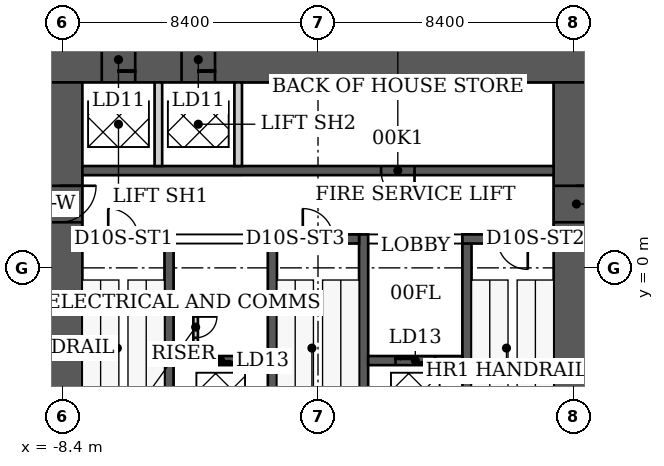
"""IFC4 building model, lengths in metres.
Left out: names, types, materials, properties, quantities, classifications, styles, units other than length and angle.
Written with IfcOpenShell. Run it as: python <this file> out.ifc"""

import sys

from ifc_helpers import new_model, si_unit, direction, frame, frame_2d, origin, place, context, subcontext, project, spatial, rectangle, extrude, element, fill, save


model = new_model("IFC4")
c1 = context("Model", 3, precision=1e-05, world=origin(), true_north=direction((0.0, 1.0)))
c2 = subcontext(c1, "Body", "Model", "MODEL_VIEW")
j1 = project(units=[si_unit("LENGTHUNIT", "METRE"), si_unit("PLANEANGLEUNIT", "RADIAN")], contexts=[c1])
p1 = place(None, origin())
s1 = spatial("IfcSite", under=j1, at=p1, CompositionType="ELEMENT")
p2 = place(p1, origin())
s2 = spatial("IfcBuilding", under=s1, at=p2, CompositionType="ELEMENT")
p3 = place(p2, origin())
s3 = spatial("IfcBuildingStorey", under=s2, at=p3, CompositionType="ELEMENT", Elevation=0.0)
p4 = place(p3, frame((-9.25, 6.85, -0.2), z_axis=(0.0, 0.0, 1.0), x_axis=(1.0, 0.0, 0.0)))
e1 = element("IfcWall", 1, at=p4, inside=s3, PredefinedType="SHEAR", context=c2, shape_type="SweptSolid", body=[
    extrude(rectangle(XDim=18.5, YDim=1.5, at=frame_2d((9.25, 0.0))), origin(), (0.0, 0.0, 1.0), 6.2),
])
p5 = place(p4, frame((2.137, 0.0, 0.2)))
e2 = element("IfcOpeningElement", 2, at=p5, cuts=e1, PredefinedType="OPENING", context=c2, shape_type="SweptSolid", body=[
    extrude(rectangle(XDim=1.1, YDim=2.1, at=frame_2d((0.55, 1.05))), frame((0.0, 0.75, 0.0), z_axis=(0.0, -1.0, 0.0), x_axis=(1.0, 0.0, 0.0)), (0.0, 0.0, 1.0), 1.5),
])
p6 = place(p4, frame((4.762, 0.0, 0.2)))
e3 = element("IfcOpeningElement", 3, at=p6, cuts=e1, PredefinedType="OPENING", context=c2, shape_type="SweptSolid", body=[
    extrude(rectangle(XDim=1.1, YDim=2.1, at=frame_2d((0.55, 1.05))), frame((0.0, 0.75, 0.0), z_axis=(0.0, -1.0, 0.0), x_axis=(1.0, 0.0, 0.0)), (0.0, 0.0, 1.0), 1.5),
])
p7 = place(p3, frame((-8.5, -9.2, -0.2), z_axis=(0.0, 0.0, 1.0), x_axis=(0.0, 1.0, 0.0)))
e4 = element("IfcWall", 4, at=p7, inside=s3, PredefinedType="SHEAR", context=c2, shape_type="SweptSolid", body=[
    extrude(rectangle(XDim=15.3, YDim=1.5, at=frame_2d((7.65, 0.0))), origin(), (0.0, 0.0, 1.0), 6.2),
])
p8 = place(p7, frame((10.7, 0.0, 0.2)))
e5 = element("IfcOpeningElement", 5, at=p8, cuts=e4, PredefinedType="OPENING", context=c2, shape_type="SweptSolid", body=[
    extrude(rectangle(XDim=1.2, YDim=2.2, at=frame_2d((0.6, 1.1))), frame((0.0, 0.75, 0.0), z_axis=(0.0, -1.0, 0.0), x_axis=(1.0, 0.0, 0.0)), (0.0, 0.0, 1.0), 1.5),
])
p9 = place(p3, frame((8.5, -9.2, -0.2), z_axis=(0.0, 0.0, 1.0), x_axis=(0.0, 1.0, 0.0)))
e6 = element("IfcWall", 6, at=p9, inside=s3, PredefinedType="SHEAR", context=c2, shape_type="SweptSolid", body=[
    extrude(rectangle(XDim=15.3, YDim=1.5, at=frame_2d((7.65, 0.0))), origin(), (0.0, 0.0, 1.0), 6.2),
])
p10 = place(p9, frame((10.7, 0.0, 0.2)))
e7 = element("IfcOpeningElement", 7, at=p10, cuts=e6, PredefinedType="OPENING", context=c2, shape_type="SweptSolid", body=[
    extrude(rectangle(XDim=1.2, YDim=2.2, at=frame_2d((0.6, 1.1))), frame((0.0, 0.75, 0.0), z_axis=(0.0, -1.0, 0.0), x_axis=(1.0, 0.0, 0.0)), (0.0, 0.0, 1.0), 1.5),
])
for number, where, z_axis, x_axis in (
    (8, (-4.9, -6.1, -0.2), (0.0, 0.0, 1.0), (0.0, 1.0, 0.0)),
    (9, (-1.5, -6.1, -0.2), (0.0, 0.0, 1.0), (0.0, 1.0, 0.0)),
    (10, (1.5, -6.1, -0.2), (0.0, 0.0, 1.0), (0.0, 1.0, 0.0)),
    (11, (4.9, -6.1, -0.2), (0.0, 0.0, 1.0), (0.0, 1.0, 0.0)),
):
    element("IfcWall", number, at=place(p3, frame(where, z_axis=z_axis, x_axis=x_axis)), inside=s3, PredefinedType="SHEAR", context=c2, shape_type="SweptSolid", body=[
        extrude(rectangle(XDim=7.2, YDim=0.3, at=frame_2d((3.6, 0.0))), origin(), (0.0, 0.0, 1.0), 6.2),
    ])
p11 = place(p3, frame((-7.75, 0.95, -0.2), z_axis=(0.0, 0.0, 1.0), x_axis=(1.0, 0.0, 0.0)))
e12 = element("IfcWall", 12, at=p11, inside=s3, PredefinedType="SHEAR", context=c2, shape_type="SweptSolid", body=[
    extrude(rectangle(XDim=3.0, YDim=0.3, at=frame_2d((1.5, 0.0))), origin(), (0.0, 0.0, 1.0), 6.2),
])
p12 = place(p11, frame((0.85, 0.0, 0.2)))
e13 = element("IfcOpeningElement", 13, at=p12, cuts=e12, PredefinedType="OPENING", context=c2, shape_type="SweptSolid", body=[
    extrude(rectangle(XDim=1.0, YDim=2.2, at=frame_2d((0.5, 1.1))), frame((0.0, 0.15, 0.0), z_axis=(0.0, -1.0, 0.0), x_axis=(1.0, 0.0, 0.0)), (0.0, 0.0, 1.0), 0.3),
])
p13 = place(p3, frame((-1.35, 0.95, -0.2), z_axis=(0.0, 0.0, 1.0), x_axis=(1.0, 0.0, 0.0)))
e14 = element("IfcWall", 14, at=p13, inside=s3, PredefinedType="SHEAR", context=c2, shape_type="SweptSolid", body=[
    extrude(rectangle(XDim=2.7, YDim=0.3, at=frame_2d((1.35, 0.0))), origin(), (0.0, 0.0, 1.0), 6.2),
])
p14 = place(p13, frame((0.85, 0.0, 0.2)))
e15 = element("IfcOpeningElement", 15, at=p14, cuts=e14, PredefinedType="OPENING", context=c2, shape_type="SweptSolid", body=[
    extrude(rectangle(XDim=1.0, YDim=2.2, at=frame_2d((0.5, 1.1))), frame((0.0, 0.15, 0.0), z_axis=(0.0, -1.0, 0.0), x_axis=(1.0, 0.0, 0.0)), (0.0, 0.0, 1.0), 0.3),
])
p15 = place(p3, frame((4.75, 0.95, -0.2), z_axis=(0.0, 0.0, 1.0), x_axis=(1.0, 0.0, 0.0)))
e16 = element("IfcWall", 16, at=p15, inside=s3, PredefinedType="SHEAR", context=c2, shape_type="SweptSolid", body=[
    extrude(rectangle(XDim=3.0, YDim=0.3, at=frame_2d((1.5, 0.0))), origin(), (0.0, 0.0, 1.0), 6.2),
])
p16 = place(p15, frame((1.15, 0.0, 0.2)))
e17 = element("IfcOpeningElement", 17, at=p16, cuts=e16, PredefinedType="OPENING", context=c2, shape_type="SweptSolid", body=[
    extrude(rectangle(XDim=1.0, YDim=2.2, at=frame_2d((0.5, 1.1))), frame((0.0, 0.15, 0.0), z_axis=(0.0, -1.0, 0.0), x_axis=(1.0, 0.0, 0.0)), (0.0, 0.0, 1.0), 0.3),
])
p17 = place(p3, frame((-4.75, -3.05, -0.2), z_axis=(0.0, 0.0, 1.0), x_axis=(1.0, 0.0, 0.0)))
e18 = element("IfcWall", 18, at=p17, inside=s3, PredefinedType="SHEAR", context=c2, shape_type="SweptSolid", body=[
    extrude(rectangle(XDim=3.1, YDim=0.3, at=frame_2d((1.55, 0.0))), origin(), (0.0, 0.0, 1.0), 6.2),
])
p18 = place(p17, frame((0.9, 0.0, 0.2)))
e19 = element("IfcOpeningElement", 19, at=p18, cuts=e18, PredefinedType="OPENING", context=c2, shape_type="SweptSolid", body=[
    extrude(rectangle(XDim=1.3, YDim=2.1, at=frame_2d((0.65, 1.05))), frame((0.0, 0.15, 0.0), z_axis=(0.0, -1.0, 0.0), x_axis=(1.0, 0.0, 0.0)), (0.0, 0.0, 1.0), 0.3),
])
p19 = place(p3, frame((1.65, -3.05, -0.2), z_axis=(0.0, 0.0, 1.0), x_axis=(1.0, 0.0, 0.0)))
e20 = element("IfcWall", 20, at=p19, inside=s3, PredefinedType="SHEAR", context=c2, shape_type="SweptSolid", body=[
    extrude(rectangle(XDim=3.1, YDim=0.3, at=frame_2d((1.55, 0.0))), origin(), (0.0, 0.0, 1.0), 6.2),
])
p20 = place(p19, frame((0.9, 0.0, 0.2)))
e21 = element("IfcOpeningElement", 21, at=p20, cuts=e20, PredefinedType="OPENING", context=c2, shape_type="SweptSolid", body=[
    extrude(rectangle(XDim=1.3, YDim=2.1, at=frame_2d((0.65, 1.05))), frame((0.0, 0.15, 0.0), z_axis=(0.0, -1.0, 0.0), x_axis=(1.0, 0.0, 0.0)), (0.0, 0.0, 1.0), 0.3),
])
p21 = place(p3, frame((-7.75, 3.2, -0.2), z_axis=(0.0, 0.0, 1.0), x_axis=(1.0, 0.0, 0.0)))
e22 = element("IfcWall", 22, at=p21, inside=s3, PredefinedType="SHEAR", context=c2, shape_type="SweptSolid", body=[
    extrude(rectangle(XDim=15.5, YDim=0.3, at=frame_2d((7.75, 0.0))), origin(), (0.0, 0.0, 1.0), 6.2),
])
p22 = place(p21, frame((9.825, 0.0, 0.2)))
e23 = element("IfcOpeningElement", 23, at=p22, cuts=e22, PredefinedType="OPENING", context=c2, shape_type="SweptSolid", body=[
    extrude(rectangle(XDim=1.1, YDim=2.2, at=frame_2d((0.55, 1.1))), frame((0.0, 0.15, 0.0), z_axis=(0.0, -1.0, 0.0), x_axis=(1.0, 0.0, 0.0)), (0.0, 0.0, 1.0), 0.3),
])
for number, where, z_axis, x_axis in (
    (24, (-5.25, 3.35, -0.2), (0.0, 0.0, 1.0), (0.0, 1.0, 0.0)),
    (25, (-2.625, 3.35, -0.2), (0.0, 0.0, 1.0), (0.0, 1.0, 0.0)),
):
    element("IfcWall", number, at=place(p3, frame(where, z_axis=z_axis, x_axis=x_axis)), inside=s3, PredefinedType="PARTITIONING", context=c2, shape_type="SweptSolid", body=[
        extrude(rectangle(XDim=2.75, YDim=0.25, at=frame_2d((1.375, 0.0))), origin(), (0.0, 0.0, 1.0), 6.2),
    ])
p23 = place(p3, frame((-4.025, -2.9, 0.0), z_axis=(0.0, 0.0, 1.0), x_axis=(0.0, 1.0, 0.0)))
e26 = element("IfcWall", 26, at=p23, inside=s3, PredefinedType="PARTITIONING", context=c2, shape_type="SweptSolid", body=[
    extrude(rectangle(XDim=1.775, YDim=0.15, at=frame_2d((0.887, 0.0))), origin(), (0.0, 0.0, 1.0), 5.84),
])
p24 = place(p23, frame((0.6, 0.0, 0.0)))
e27 = element("IfcOpeningElement", 27, at=p24, cuts=e26, PredefinedType="OPENING", context=c2, shape_type="SweptSolid", body=[
    extrude(rectangle(XDim=0.7, YDim=2.1, at=frame_2d((0.35, 1.05))), frame((0.0, 0.075, 0.0), z_axis=(0.0, -1.0, 0.0), x_axis=(1.0, 0.0, 0.0)), (0.0, 0.0, 1.0), 0.15),
])
p25 = place(p3, frame((-4.75, -1.2, 0.0), z_axis=(0.0, 0.0, 1.0), x_axis=(1.0, 0.0, 0.0)))
e28 = element("IfcWall", 28, at=p25, inside=s3, PredefinedType="PARTITIONING", context=c2, shape_type="SweptSolid", body=[
    extrude(rectangle(XDim=0.8, YDim=0.15, at=frame_2d((0.4, 0.0))), origin(), (0.0, 0.0, 1.0), 5.84),
])
p26 = place(p12, origin())
e29 = element("IfcDoor", 29, at=p26, inside=s3, OperationType="SINGLE_SWING_LEFT", PredefinedType="DOOR", context=c2, shape_type="SweptSolid", body=[
    extrude(rectangle(XDim=1.0, YDim=2.2, at=frame_2d((0.5, 1.1))), frame((0.0, 0.025, 0.0), z_axis=(0.0, -1.0, 0.0), x_axis=(1.0, 0.0, 0.0)), (0.0, 0.0, 1.0), 0.05),
])
fill(e13, e29)
p27 = place(p14, origin())
e30 = element("IfcDoor", 30, at=p27, inside=s3, OperationType="SINGLE_SWING_LEFT", PredefinedType="DOOR", context=c2, shape_type="SweptSolid", body=[
    extrude(rectangle(XDim=1.0, YDim=2.2, at=frame_2d((0.5, 1.1))), frame((0.0, 0.025, 0.0), z_axis=(0.0, -1.0, 0.0), x_axis=(1.0, 0.0, 0.0)), (0.0, 0.0, 1.0), 0.05),
])
fill(e15, e30)
p28 = place(p16, origin())
e31 = element("IfcDoor", 31, at=p28, inside=s3, OperationType="SINGLE_SWING_RIGHT", PredefinedType="DOOR", context=c2, shape_type="SweptSolid", body=[
    extrude(rectangle(XDim=1.0, YDim=2.2, at=frame_2d((0.5, 1.1))), frame((0.0, 0.025, 0.0), z_axis=(0.0, -1.0, 0.0), x_axis=(1.0, 0.0, 0.0)), (0.0, 0.0, 1.0), 0.05),
])
fill(e17, e31)
p29 = place(p8, origin())
e32 = element("IfcDoor", 32, at=p29, inside=s3, OperationType="SINGLE_SWING_RIGHT", PredefinedType="DOOR", context=c2, shape_type="SweptSolid", body=[
    extrude(rectangle(XDim=1.2, YDim=2.2, at=frame_2d((0.6, 1.1))), frame((0.0, 0.025, 0.0), z_axis=(0.0, -1.0, 0.0), x_axis=(1.0, 0.0, 0.0)), (0.0, 0.0, 1.0), 0.05),
])
fill(e5, e32)
p30 = place(p10, origin())
e33 = element("IfcDoor", 33, at=p30, inside=s3, OperationType="SINGLE_SWING_RIGHT", PredefinedType="DOOR", context=c2, shape_type="SweptSolid", body=[
    extrude(rectangle(XDim=1.2, YDim=2.2, at=frame_2d((0.6, 1.1))), frame((0.0, 0.025, 0.0), z_axis=(0.0, -1.0, 0.0), x_axis=(1.0, 0.0, 0.0)), (0.0, 0.0, 1.0), 0.05),
])
fill(e7, e33)
p31 = place(p24, origin())
e34 = element("IfcDoor", 34, at=p31, inside=s3, OperationType="SINGLE_SWING_RIGHT", PredefinedType="DOOR", context=c2, shape_type="SweptSolid", body=[
    extrude(rectangle(XDim=0.7, YDim=2.1, at=frame_2d((0.35, 1.05))), frame((0.0, 0.025, 0.0), z_axis=(0.0, -1.0, 0.0), x_axis=(1.0, 0.0, 0.0)), (0.0, 0.0, 1.0), 0.05),
])
fill(e27, e34)
p32 = place(p22, origin())
e35 = element("IfcDoor", 35, at=p32, inside=s3, OperationType="SINGLE_SWING_RIGHT", PredefinedType="DOOR", context=c2, shape_type="SweptSolid", body=[
    extrude(rectangle(XDim=1.1, YDim=2.2, at=frame_2d((0.55, 1.1))), frame((0.0, 0.025, 0.0), z_axis=(0.0, -1.0, 0.0), x_axis=(1.0, 0.0, 0.0)), (0.0, 0.0, 1.0), 0.05),
])
fill(e23, e35)
p33 = place(p5, origin())
e36 = element("IfcDoor", 36, at=p33, inside=s3, OperationType="DOUBLE_DOOR_SLIDING", PredefinedType="DOOR", context=c2, shape_type="SweptSolid", body=[
    extrude(rectangle(XDim=1.1, YDim=2.1, at=frame_2d((0.55, 1.05))), frame((0.0, 0.025, 0.0), z_axis=(0.0, -1.0, 0.0), x_axis=(1.0, 0.0, 0.0)), (0.0, 0.0, 1.0), 0.05),
])
fill(e2, e36)
p34 = place(p6, origin())
e37 = element("IfcDoor", 37, at=p34, inside=s3, OperationType="DOUBLE_DOOR_SLIDING", PredefinedType="DOOR", context=c2, shape_type="SweptSolid", body=[
    extrude(rectangle(XDim=1.1, YDim=2.1, at=frame_2d((0.55, 1.05))), frame((0.0, 0.025, 0.0), z_axis=(0.0, -1.0, 0.0), x_axis=(1.0, 0.0, 0.0)), (0.0, 0.0, 1.0), 0.05),
])
fill(e3, e37)
p35 = place(p18, origin())
e38 = element("IfcDoor", 38, at=p35, inside=s3, OperationType="DOUBLE_DOOR_SLIDING", PredefinedType="DOOR", context=c2, shape_type="SweptSolid", body=[
    extrude(rectangle(XDim=1.3, YDim=2.1, at=frame_2d((0.65, 1.05))), frame((0.0, 0.025, 0.0), z_axis=(0.0, -1.0, 0.0), x_axis=(1.0, 0.0, 0.0)), (0.0, 0.0, 1.0), 0.05),
])
fill(e19, e38)
p36 = place(p20, origin())
e39 = element("IfcDoor", 39, at=p36, inside=s3, OperationType="DOUBLE_DOOR_SLIDING", PredefinedType="DOOR", context=c2, shape_type="SweptSolid", body=[
    extrude(rectangle(XDim=1.3, YDim=2.1, at=frame_2d((0.65, 1.05))), frame((0.0, 0.025, 0.0), z_axis=(0.0, -1.0, 0.0), x_axis=(1.0, 0.0, 0.0)), (0.0, 0.0, 1.0), 0.05),
])
fill(e21, e39)
save(model, sys.argv[1])
